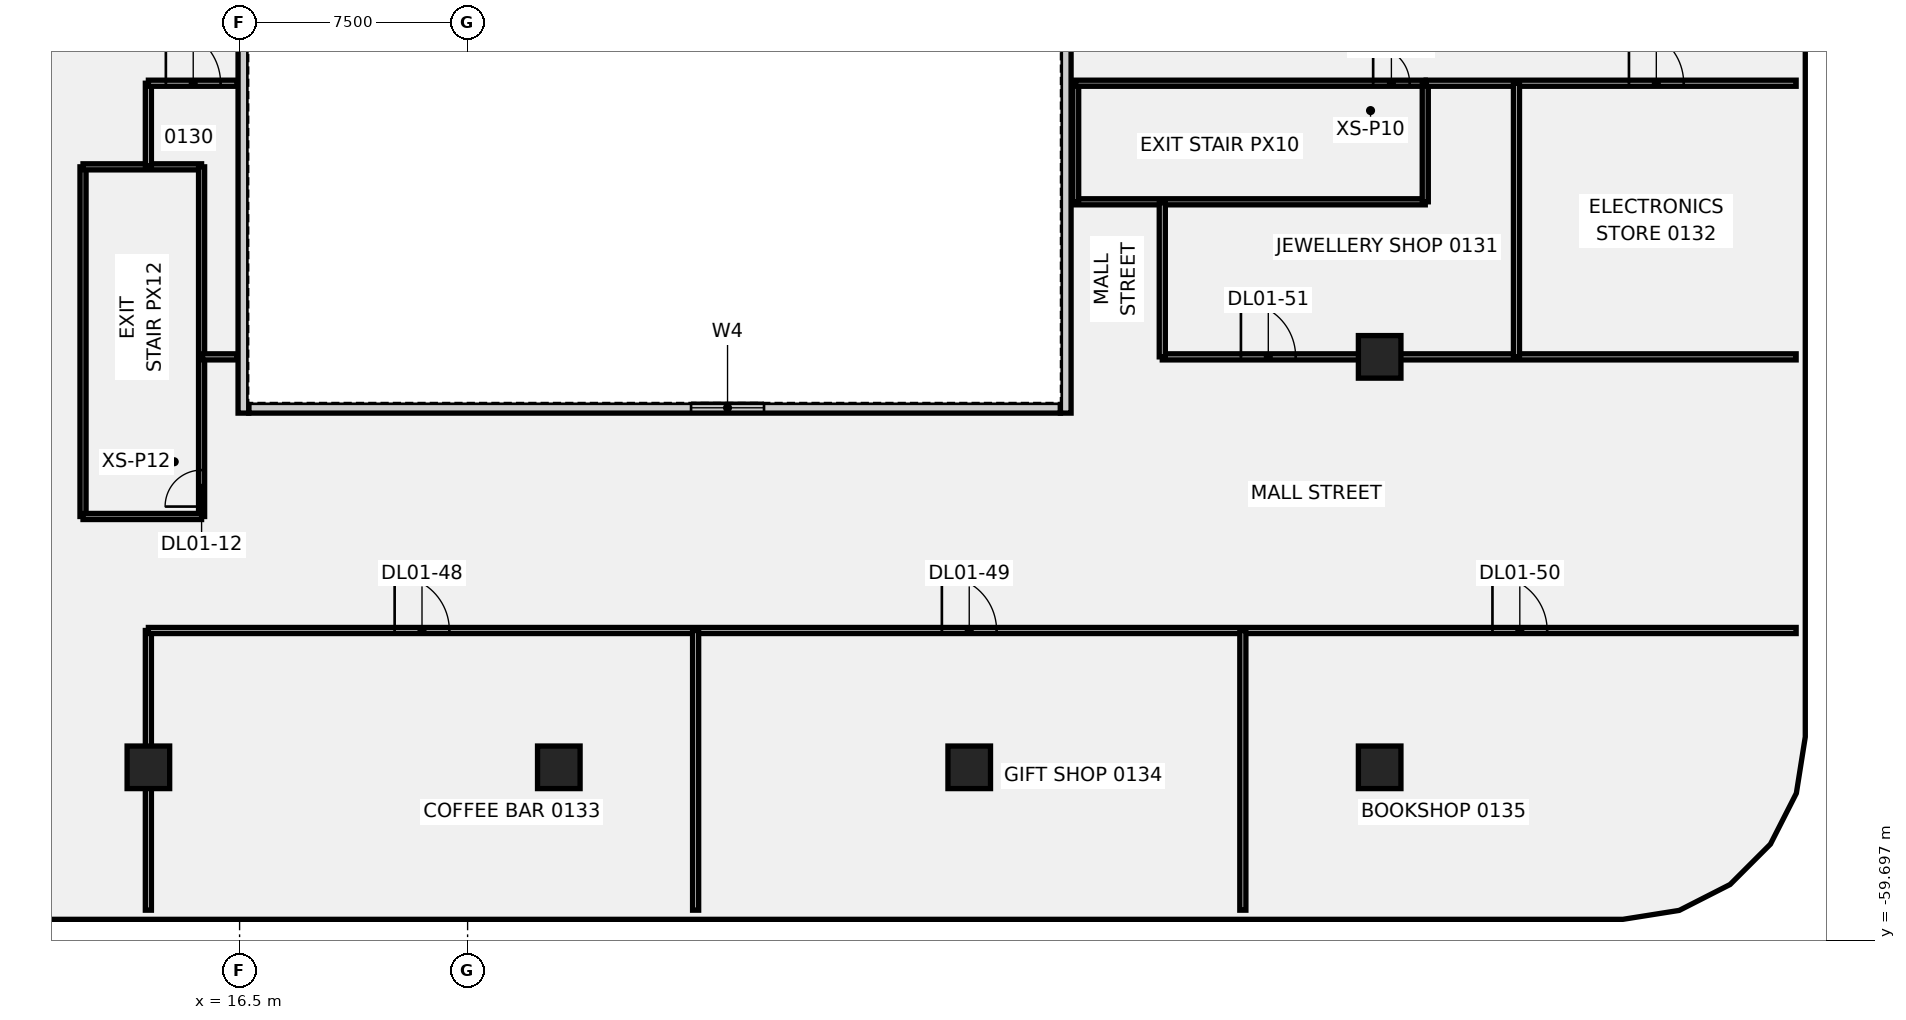
"""IFC4 building model, lengths in metres.
Left out: names, types, materials, properties, quantities, classifications, styles, units other than length and angle.
Written with IfcOpenShell. Run it as: python <this file> out.ifc"""

import sys

from ifc_helpers import new_model, si_unit, direction, frame, frame_2d, origin, origin_2d, place, context, subcontext, project, spatial, rectangle, extrude, element, fill, save


model = new_model("IFC4")
c1 = context("Model", 3, precision=1e-05, world=origin(), true_north=direction((0.0, 1.0)))
c2 = subcontext(c1, "Body", "Model", "MODEL_VIEW")
j1 = project(units=[si_unit("LENGTHUNIT", "METRE"), si_unit("PLANEANGLEUNIT", "RADIAN")], contexts=[c1])
p1 = place(None, origin())
s1 = spatial("IfcSite", under=j1, at=p1, CompositionType="ELEMENT")
p2 = place(p1, origin())
s2 = spatial("IfcBuilding", under=s1, at=p2, CompositionType="ELEMENT")
p3 = place(p2, frame((0.0, 0.0, 9.0)))
s3 = spatial("IfcBuildingStorey", under=s2, at=p3, CompositionType="ELEMENT", Elevation=9.0)
for number, where, z_axis, x_axis in (
    (1, (13.5, -54.0, -0.5), (0.0, 0.0, 1.0), (1.0, 0.0, 0.0)),
    (2, (27.0, -54.0, -0.5), (0.0, 0.0, 1.0), (1.0, 0.0, 0.0)),
    (3, (40.5, -54.0, -0.5), (0.0, 0.0, 1.0), (1.0, 0.0, 0.0)),
    (4, (54.0, -54.0, -0.5), (0.0, 0.0, 1.0), (1.0, 0.0, 0.0)),
    (5, (54.0, -40.5, -0.5), (0.0, 0.0, 1.0), (1.0, 0.0, 0.0)),
):
    element("IfcColumn", number, at=place(p3, frame(where, z_axis=z_axis, x_axis=x_axis)), inside=s3, PredefinedType="COLUMN", context=c2, shape_type="SweptSolid", body=[
        extrude(rectangle(XDim=1.4, YDim=1.4, at=origin_2d()), origin(), (0.0, 0.0, 1.0), 6.0),
    ])
p4 = place(p3, frame((11.35, -45.75, 0.0), z_axis=(0.0, 0.0, 1.0), x_axis=(0.0, 1.0, 0.0)))
e6 = element("IfcWall", 6, at=p4, inside=s3, PredefinedType="PARTITIONING", context=c2, shape_type="SweptSolid", body=[
    extrude(rectangle(XDim=11.5, YDim=0.2, at=frame_2d((5.75, 0.0))), origin(), (0.0, 0.0, 1.0), 5.5),
])
p5 = place(p3, frame((11.35, -34.25, 0.0), z_axis=(0.0, 0.0, 1.0), x_axis=(1.0, 0.0, 0.0)))
e7 = element("IfcWall", 7, at=p5, inside=s3, PredefinedType="PARTITIONING", context=c2, shape_type="SweptSolid", body=[
    extrude(rectangle(XDim=3.9, YDim=0.2, at=frame_2d((1.95, 0.0))), origin(), (0.0, 0.0, 1.0), 5.5),
])
p6 = place(p3, frame((15.25, -45.75, 0.0), z_axis=(0.0, 0.0, 1.0), x_axis=(0.0, 1.0, 0.0)))
e8 = element("IfcWall", 8, at=p6, inside=s3, PredefinedType="PARTITIONING", context=c2, shape_type="SweptSolid", body=[
    extrude(rectangle(XDim=11.5, YDim=0.2, at=frame_2d((5.75, 0.0))), origin(), (0.0, 0.0, 1.0), 5.5),
])
p7 = place(p6, frame((0.326, 0.0, 0.0)))
e9 = element("IfcOpeningElement", 9, at=p7, cuts=e8, PredefinedType="OPENING", context=c2, shape_type="SweptSolid", body=[
    extrude(rectangle(XDim=1.2, YDim=2.1, at=frame_2d((0.6, 1.05))), frame((0.0, 0.11, 0.0), z_axis=(0.0, -1.0, 0.0), x_axis=(1.0, 0.0, 0.0)), (0.0, 0.0, 1.0), 0.22),
])
p8 = place(p3, frame((11.35, -45.75, 0.0), z_axis=(0.0, 0.0, 1.0), x_axis=(1.0, 0.0, 0.0)))
e10 = element("IfcWall", 10, at=p8, inside=s3, PredefinedType="PARTITIONING", context=c2, shape_type="SweptSolid", body=[
    extrude(rectangle(XDim=3.9, YDim=0.2, at=frame_2d((1.95, 0.0))), origin(), (0.0, 0.0, 1.0), 5.5),
])
p9 = place(p3, frame((44.0, -35.4, 0.0), z_axis=(0.0, 0.0, 1.0), x_axis=(1.0, 0.0, 0.0)))
e11 = element("IfcWall", 11, at=p9, inside=s3, PredefinedType="PARTITIONING", context=c2, shape_type="SweptSolid", body=[
    extrude(rectangle(XDim=11.5, YDim=0.2, at=frame_2d((5.75, 0.0))), origin(), (0.0, 0.0, 1.0), 5.5),
])
p10 = place(p3, frame((44.0, -35.4, 0.0), z_axis=(0.0, 0.0, 1.0), x_axis=(0.0, 1.0, 0.0)))
e12 = element("IfcWall", 12, at=p10, inside=s3, PredefinedType="PARTITIONING", context=c2, shape_type="SweptSolid", body=[
    extrude(rectangle(XDim=3.9, YDim=0.2, at=frame_2d((1.95, 0.0))), origin(), (0.0, 0.0, 1.0), 5.5),
])
p11 = place(p3, frame((44.0, -31.5, 0.0), z_axis=(0.0, 0.0, 1.0), x_axis=(1.0, 0.0, 0.0)))
e13 = element("IfcWall", 13, at=p11, inside=s3, PredefinedType="PARTITIONING", context=c2, shape_type="SweptSolid", body=[
    extrude(rectangle(XDim=11.5, YDim=0.2, at=frame_2d((5.75, 0.0))), origin(), (0.0, 0.0, 1.0), 5.5),
])
p12 = place(p11, frame((9.786, 0.0, 0.0)))
e14 = element("IfcOpeningElement", 14, at=p12, cuts=e13, PredefinedType="OPENING", context=c2, shape_type="SweptSolid", body=[
    extrude(rectangle(XDim=1.2, YDim=2.1, at=frame_2d((0.6, 1.05))), frame((0.0, 0.11, 0.0), z_axis=(0.0, -1.0, 0.0), x_axis=(1.0, 0.0, 0.0)), (0.0, 0.0, 1.0), 0.22),
])
p13 = place(p3, frame((55.5, -35.4, 0.0), z_axis=(0.0, 0.0, 1.0), x_axis=(0.0, 1.0, 0.0)))
e15 = element("IfcWall", 15, at=p13, inside=s3, PredefinedType="PARTITIONING", context=c2, shape_type="SweptSolid", body=[
    extrude(rectangle(XDim=3.9, YDim=0.2, at=frame_2d((1.95, 0.0))), origin(), (0.0, 0.0, 1.0), 5.5),
])
p14 = place(p3, frame((13.5, -58.699, 0.0), z_axis=(0.0, 0.0, 1.0), x_axis=(0.0, 1.0, 0.0)))
e16 = element("IfcWall", 16, at=p14, inside=s3, PredefinedType="PARTITIONING", context=c2, shape_type="SweptSolid", body=[
    extrude(rectangle(XDim=9.199, YDim=0.2, at=frame_2d((4.6, 0.0))), origin(), (0.0, 0.0, 1.0), 5.5),
])
p15 = place(p3, frame((13.5, -49.5, 0.0), z_axis=(0.0, 0.0, 1.0), x_axis=(1.0, 0.0, 0.0)))
e17 = element("IfcWall", 17, at=p15, inside=s3, PredefinedType="PARTITIONING", context=c2, shape_type="SweptSolid", body=[
    extrude(rectangle(XDim=54.199, YDim=0.2, at=frame_2d((27.1, 0.0))), origin(), (0.0, 0.0, 1.0), 5.5),
])
p16 = place(p15, frame((8.1, 0.0, 0.0)))
e18 = element("IfcOpeningElement", 18, at=p16, cuts=e17, PredefinedType="OPENING", context=c2, shape_type="SweptSolid", body=[
    extrude(rectangle(XDim=1.8, YDim=2.1, at=frame_2d((0.9, 1.05))), frame((0.0, 0.11, 0.0), z_axis=(0.0, -1.0, 0.0), x_axis=(1.0, 0.0, 0.0)), (0.0, 0.0, 1.0), 0.22),
])
p17 = place(p15, frame((26.1, 0.0, 0.0)))
e19 = element("IfcOpeningElement", 19, at=p17, cuts=e17, PredefinedType="OPENING", context=c2, shape_type="SweptSolid", body=[
    extrude(rectangle(XDim=1.8, YDim=2.1, at=frame_2d((0.9, 1.05))), frame((0.0, 0.11, 0.0), z_axis=(0.0, -1.0, 0.0), x_axis=(1.0, 0.0, 0.0)), (0.0, 0.0, 1.0), 0.22),
])
p18 = place(p15, frame((44.21, 0.0, 0.0)))
e20 = element("IfcOpeningElement", 20, at=p18, cuts=e17, PredefinedType="OPENING", context=c2, shape_type="SweptSolid", body=[
    extrude(rectangle(XDim=1.8, YDim=2.1, at=frame_2d((0.9, 1.05))), frame((0.0, 0.11, 0.0), z_axis=(0.0, -1.0, 0.0), x_axis=(1.0, 0.0, 0.0)), (0.0, 0.0, 1.0), 0.22),
])
p19 = place(p3, frame((13.5, -34.22, 0.0), z_axis=(0.0, 0.0, 1.0), x_axis=(0.0, 1.0, 0.0)))
e21 = element("IfcWall", 21, at=p19, inside=s3, PredefinedType="PARTITIONING", context=c2, shape_type="SweptSolid", body=[
    extrude(rectangle(XDim=2.72, YDim=0.2, at=frame_2d((1.36, 0.0))), origin(), (0.0, 0.0, 1.0), 5.5),
])
p20 = place(p3, frame((13.5, -31.5, 0.0), z_axis=(0.0, 0.0, 1.0), x_axis=(1.0, 0.0, 0.0)))
e22 = element("IfcWall", 22, at=p20, inside=s3, PredefinedType="PARTITIONING", context=c2, shape_type="SweptSolid", body=[
    extrude(rectangle(XDim=2.92, YDim=0.2, at=frame_2d((1.46, 0.0))), origin(), (0.0, 0.0, 1.0), 5.5),
])
p21 = place(p20, frame((0.575, 0.0, 0.0)))
e23 = element("IfcOpeningElement", 23, at=p21, cuts=e22, PredefinedType="OPENING", context=c2, shape_type="SweptSolid", body=[
    extrude(rectangle(XDim=1.8, YDim=2.1, at=frame_2d((0.9, 1.05))), frame((0.0, 0.11, 0.0), z_axis=(0.0, -1.0, 0.0), x_axis=(1.0, 0.0, 0.0)), (0.0, 0.0, 1.0), 0.22),
])
p22 = place(p3, frame((15.28, -40.5, 0.0), z_axis=(0.0, 0.0, 1.0), x_axis=(1.0, 0.0, 0.0)))
e24 = element("IfcWall", 24, at=p22, inside=s3, PredefinedType="PARTITIONING", context=c2, shape_type="SweptSolid", body=[
    extrude(rectangle(XDim=1.14, YDim=0.2, at=frame_2d((0.57, 0.0))), origin(), (0.0, 0.0, 1.0), 5.5),
])
p23 = place(p3, frame((31.5, -58.699, 0.0), z_axis=(0.0, 0.0, 1.0), x_axis=(0.0, 1.0, 0.0)))
e25 = element("IfcWall", 25, at=p23, inside=s3, PredefinedType="PARTITIONING", context=c2, shape_type="SweptSolid", body=[
    extrude(rectangle(XDim=9.199, YDim=0.2, at=frame_2d((4.6, 0.0))), origin(), (0.0, 0.0, 1.0), 5.5),
])
p24 = place(p3, frame((46.85, -40.5, 0.0), z_axis=(0.0, 0.0, 1.0), x_axis=(1.0, 0.0, 0.0)))
e26 = element("IfcWall", 26, at=p24, inside=s3, PredefinedType="PARTITIONING", context=c2, shape_type="SweptSolid", body=[
    extrude(rectangle(XDim=20.849, YDim=0.2, at=frame_2d((10.424, 0.0))), origin(), (0.0, 0.0, 1.0), 5.5),
])
p25 = place(p24, frame((2.587, 0.0, 0.0)))
e27 = element("IfcOpeningElement", 27, at=p25, cuts=e26, PredefinedType="OPENING", context=c2, shape_type="SweptSolid", body=[
    extrude(rectangle(XDim=1.8, YDim=2.1, at=frame_2d((0.9, 1.05))), frame((0.0, 0.11, 0.0), z_axis=(0.0, -1.0, 0.0), x_axis=(1.0, 0.0, 0.0)), (0.0, 0.0, 1.0), 0.22),
])
p26 = place(p3, frame((46.85, -40.5, 0.0), z_axis=(0.0, 0.0, 1.0), x_axis=(0.0, 1.0, 0.0)))
e28 = element("IfcWall", 28, at=p26, inside=s3, PredefinedType="PARTITIONING", context=c2, shape_type="SweptSolid", body=[
    extrude(rectangle(XDim=5.07, YDim=0.2, at=frame_2d((2.535, 0.0))), origin(), (0.0, 0.0, 1.0), 5.5),
])
p27 = place(p3, frame((49.5, -58.699, 0.0), z_axis=(0.0, 0.0, 1.0), x_axis=(0.0, 1.0, 0.0)))
e29 = element("IfcWall", 29, at=p27, inside=s3, PredefinedType="PARTITIONING", context=c2, shape_type="SweptSolid", body=[
    extrude(rectangle(XDim=9.199, YDim=0.2, at=frame_2d((4.6, 0.0))), origin(), (0.0, 0.0, 1.0), 5.5),
])
p28 = place(p3, frame((55.53, -31.5, 0.0), z_axis=(0.0, 0.0, 1.0), x_axis=(1.0, 0.0, 0.0)))
e30 = element("IfcWall", 30, at=p28, inside=s3, PredefinedType="PARTITIONING", context=c2, shape_type="SweptSolid", body=[
    extrude(rectangle(XDim=12.169, YDim=0.2, at=frame_2d((6.084, 0.0))), origin(), (0.0, 0.0, 1.0), 5.5),
])
p29 = place(p28, frame((6.67, 0.0, 0.0)))
e31 = element("IfcOpeningElement", 31, at=p29, cuts=e30, PredefinedType="OPENING", context=c2, shape_type="SweptSolid", body=[
    extrude(rectangle(XDim=1.8, YDim=2.1, at=frame_2d((0.9, 1.05))), frame((0.0, 0.11, 0.0), z_axis=(0.0, -1.0, 0.0), x_axis=(1.0, 0.0, 0.0)), (0.0, 0.0, 1.0), 0.22),
])
p30 = place(p3, frame((58.5, -40.5, 0.0), z_axis=(0.0, 0.0, 1.0), x_axis=(0.0, 1.0, 0.0)))
e32 = element("IfcWall", 32, at=p30, inside=s3, PredefinedType="PARTITIONING", context=c2, shape_type="SweptSolid", body=[
    extrude(rectangle(XDim=9.0, YDim=0.2, at=frame_2d((4.5, 0.0))), origin(), (0.0, 0.0, 1.0), 5.5),
])
p31 = place(p3, frame((16.8, -42.175, 0.0), z_axis=(0.0, 0.0, 1.0), x_axis=(1.0, 0.0, 0.0)))
e33 = element("IfcWall", 33, at=p31, inside=s3, PredefinedType="SOLIDWALL", context=c2, shape_type="SweptSolid", body=[
    extrude(rectangle(XDim=26.7, YDim=0.35, at=frame_2d((13.35, 0.0))), origin(), (0.0, 0.0, 1.0), 5.5),
])
p32 = place(p31, frame((14.55, 0.0, 1.0)))
e34 = element("IfcOpeningElement", 34, at=p32, cuts=e33, PredefinedType="OPENING", context=c2, shape_type="SweptSolid", body=[
    extrude(rectangle(XDim=2.4, YDim=1.8, at=frame_2d((1.2, 0.9))), frame((0.0, 0.185, 0.0), z_axis=(0.0, -1.0, 0.0), x_axis=(1.0, 0.0, 0.0)), (0.0, 0.0, 1.0), 0.37),
])
p33 = place(p3, frame((16.625, -42.35, 0.0), z_axis=(0.0, 0.0, 1.0), x_axis=(0.0, 1.0, 0.0)))
e35 = element("IfcWall", 35, at=p33, inside=s3, PredefinedType="SOLIDWALL", context=c2, shape_type="SweptSolid", body=[
    extrude(rectangle(XDim=18.7, YDim=0.35, at=frame_2d((9.35, 0.0))), origin(), (0.0, 0.0, 1.0), 5.5),
])
p34 = place(p33, frame((14.9, 0.0, 1.0)))
e36 = element("IfcOpeningElement", 36, at=p34, cuts=e35, PredefinedType="OPENING", context=c2, shape_type="SweptSolid", body=[
    extrude(rectangle(XDim=2.4, YDim=1.8, at=frame_2d((1.2, 0.9))), frame((0.0, 0.185, 0.0), z_axis=(0.0, -1.0, 0.0), x_axis=(1.0, 0.0, 0.0)), (0.0, 0.0, 1.0), 0.37),
])
p35 = place(p3, frame((43.675, -42.35, 0.0), z_axis=(0.0, 0.0, 1.0), x_axis=(0.0, 1.0, 0.0)))
e37 = element("IfcWall", 37, at=p35, inside=s3, PredefinedType="SOLIDWALL", context=c2, shape_type="SweptSolid", body=[
    extrude(rectangle(XDim=18.7, YDim=0.35, at=frame_2d((9.35, 0.0))), origin(), (0.0, 0.0, 1.0), 5.5),
])
p36 = place(p35, frame((14.9, 0.0, 1.0)))
e38 = element("IfcOpeningElement", 38, at=p36, cuts=e37, PredefinedType="OPENING", context=c2, shape_type="SweptSolid", body=[
    extrude(rectangle(XDim=2.4, YDim=1.8, at=frame_2d((1.2, 0.9))), frame((0.0, 0.185, 0.0), z_axis=(0.0, -1.0, 0.0), x_axis=(1.0, 0.0, 0.0)), (0.0, 0.0, 1.0), 0.37),
])
p37 = place(p12, origin())
e39 = element("IfcDoor", 39, at=p37, inside=s3, OperationType="SINGLE_SWING_RIGHT", PredefinedType="DOOR", context=c2, shape_type="SweptSolid", body=[
    extrude(rectangle(XDim=1.2, YDim=2.1, at=frame_2d((0.6, 1.05))), frame((0.0, 0.025, 0.0), z_axis=(0.0, -1.0, 0.0), x_axis=(1.0, 0.0, 0.0)), (0.0, 0.0, 1.0), 0.05),
])
fill(e14, e39)
p38 = place(p7, origin())
e40 = element("IfcDoor", 40, at=p38, inside=s3, OperationType="SINGLE_SWING_RIGHT", PredefinedType="DOOR", context=c2, shape_type="SweptSolid", body=[
    extrude(rectangle(XDim=1.2, YDim=2.1, at=frame_2d((0.6, 1.05))), frame((0.0, 0.025, 0.0), z_axis=(0.0, -1.0, 0.0), x_axis=(1.0, 0.0, 0.0)), (0.0, 0.0, 1.0), 0.05),
])
fill(e9, e40)
p39 = place(p21, origin())
e41 = element("IfcDoor", 41, at=p39, inside=s3, OperationType="SINGLE_SWING_RIGHT", PredefinedType="DOOR", context=c2, shape_type="SweptSolid", body=[
    extrude(rectangle(XDim=1.8, YDim=2.1, at=frame_2d((0.9, 1.05))), frame((0.0, 0.025, 0.0), z_axis=(0.0, -1.0, 0.0), x_axis=(1.0, 0.0, 0.0)), (0.0, 0.0, 1.0), 0.05),
])
fill(e23, e41)
p40 = place(p29, origin())
e42 = element("IfcDoor", 42, at=p40, inside=s3, OperationType="SINGLE_SWING_LEFT", PredefinedType="DOOR", context=c2, shape_type="SweptSolid", body=[
    extrude(rectangle(XDim=1.8, YDim=2.1, at=frame_2d((0.9, 1.05))), frame((0.0, 0.025, 0.0), z_axis=(0.0, -1.0, 0.0), x_axis=(1.0, 0.0, 0.0)), (0.0, 0.0, 1.0), 0.05),
])
fill(e31, e42)
p41 = place(p16, origin())
e43 = element("IfcDoor", 43, at=p41, inside=s3, OperationType="SINGLE_SWING_RIGHT", PredefinedType="DOOR", context=c2, shape_type="SweptSolid", body=[
    extrude(rectangle(XDim=1.8, YDim=2.1, at=frame_2d((0.9, 1.05))), frame((0.0, 0.025, 0.0), z_axis=(0.0, -1.0, 0.0), x_axis=(1.0, 0.0, 0.0)), (0.0, 0.0, 1.0), 0.05),
])
fill(e18, e43)
p42 = place(p17, origin())
e44 = element("IfcDoor", 44, at=p42, inside=s3, OperationType="SINGLE_SWING_LEFT", PredefinedType="DOOR", context=c2, shape_type="SweptSolid", body=[
    extrude(rectangle(XDim=1.8, YDim=2.1, at=frame_2d((0.9, 1.05))), frame((0.0, 0.025, 0.0), z_axis=(0.0, -1.0, 0.0), x_axis=(1.0, 0.0, 0.0)), (0.0, 0.0, 1.0), 0.05),
])
fill(e19, e44)
p43 = place(p18, origin())
e45 = element("IfcDoor", 45, at=p43, inside=s3, OperationType="SINGLE_SWING_RIGHT", PredefinedType="DOOR", context=c2, shape_type="SweptSolid", body=[
    extrude(rectangle(XDim=1.8, YDim=2.1, at=frame_2d((0.9, 1.05))), frame((0.0, 0.025, 0.0), z_axis=(0.0, -1.0, 0.0), x_axis=(1.0, 0.0, 0.0)), (0.0, 0.0, 1.0), 0.05),
])
fill(e20, e45)
p44 = place(p25, origin())
e46 = element("IfcDoor", 46, at=p44, inside=s3, OperationType="SINGLE_SWING_LEFT", PredefinedType="DOOR", context=c2, shape_type="SweptSolid", body=[
    extrude(rectangle(XDim=1.8, YDim=2.1, at=frame_2d((0.9, 1.05))), frame((0.0, 0.025, 0.0), z_axis=(0.0, -1.0, 0.0), x_axis=(1.0, 0.0, 0.0)), (0.0, 0.0, 1.0), 0.05),
])
fill(e27, e46)
p45 = place(p32, origin())
e47 = element("IfcWindow", 47, at=p45, inside=s3, PartitioningType="SINGLE_PANEL", PredefinedType="WINDOW", context=c2, shape_type="SweptSolid", body=[
    extrude(rectangle(XDim=2.4, YDim=1.8, at=frame_2d((1.2, 0.9))), frame((0.0, 0.03, 0.0), z_axis=(0.0, -1.0, 0.0), x_axis=(1.0, 0.0, 0.0)), (0.0, 0.0, 1.0), 0.06),
])
fill(e34, e47)
save(model, sys.argv[1])
